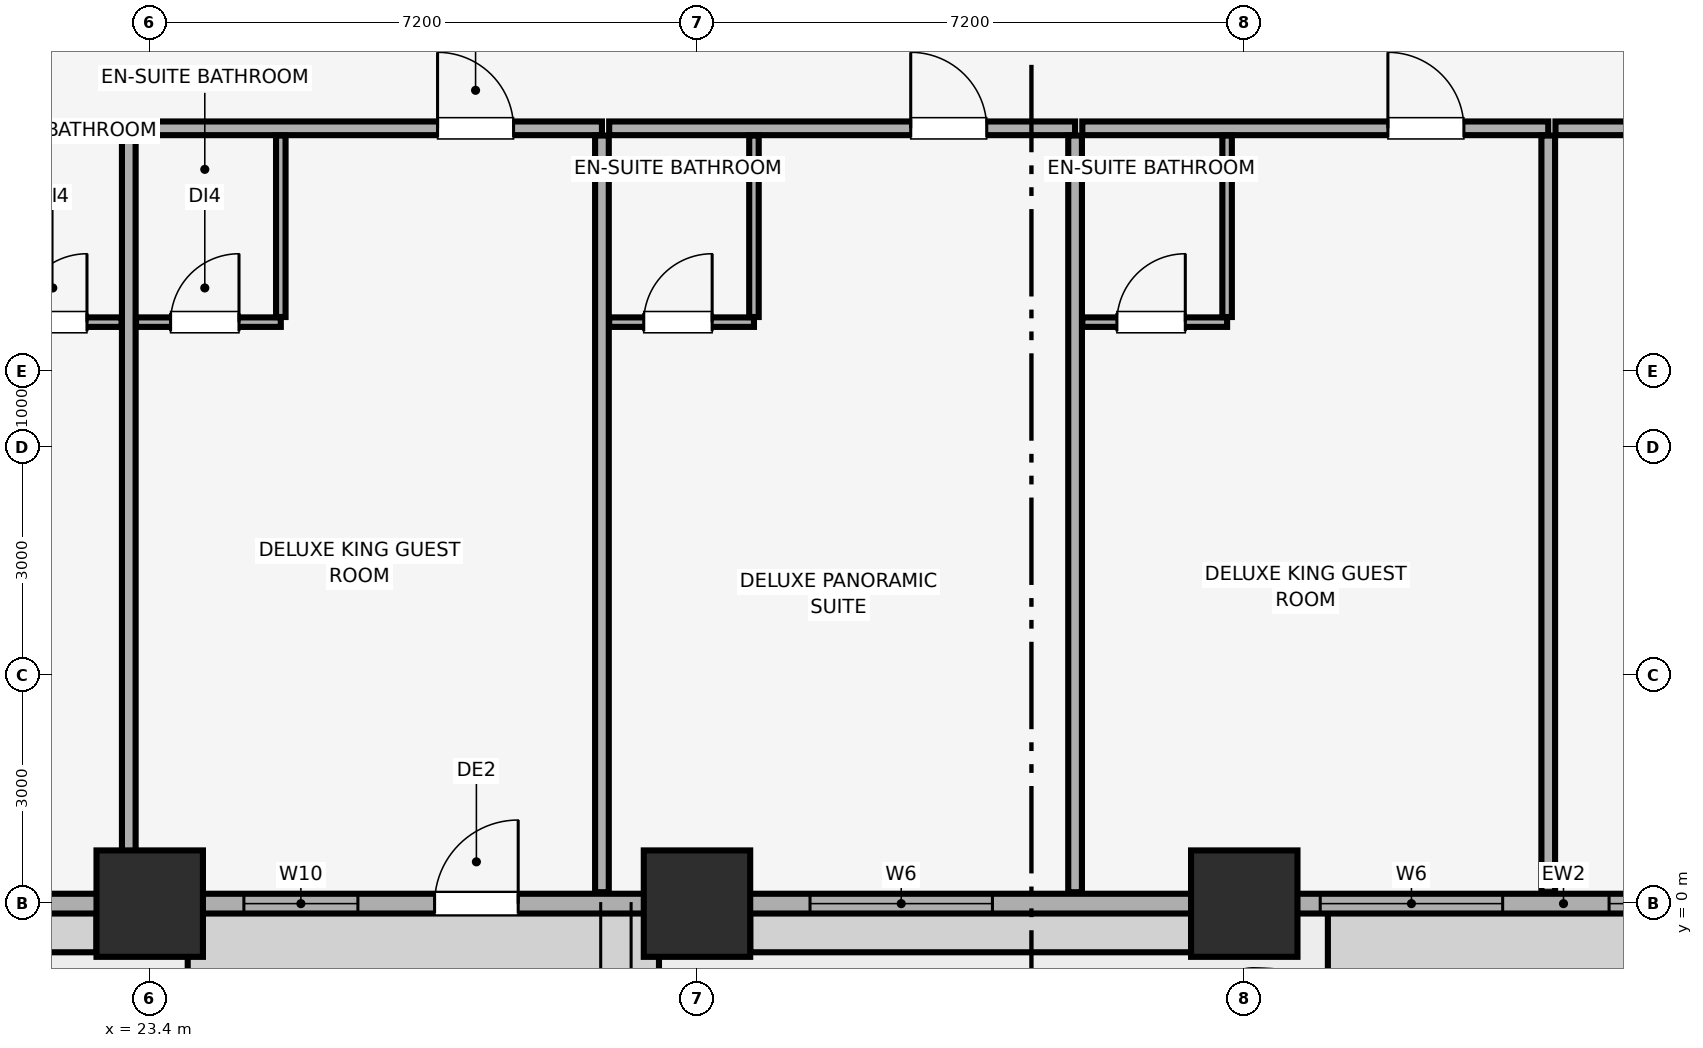
"""IFC4 building model, lengths in metres.
Left out: names, types, materials, properties, quantities, classifications, styles, units other than length and angle.
Written with IfcOpenShell. Run it as: python <this file> out.ifc"""

import sys

from ifc_helpers import new_model, si_unit, direction, frame, frame_2d, origin, origin_2d, place, context, subcontext, project, spatial, rectangle, extrude, element, fill, save


model = new_model("IFC4")
c1 = context("Model", 3, precision=1e-05, world=origin(), true_north=direction((0.0, 1.0)))
c2 = subcontext(c1, "Body", "Model", "MODEL_VIEW")
j1 = project(units=[si_unit("LENGTHUNIT", "METRE"), si_unit("PLANEANGLEUNIT", "RADIAN")], contexts=[c1])
p1 = place(None, origin())
s1 = spatial("IfcSite", under=j1, at=p1, CompositionType="ELEMENT")
p2 = place(p1, origin())
s2 = spatial("IfcBuilding", under=s1, at=p2, CompositionType="ELEMENT")
p3 = place(p2, frame((0.0, 0.0, 46.4)))
s3 = spatial("IfcBuildingStorey", under=s2, at=p3, CompositionType="ELEMENT", Elevation=46.4)
for number, where, z_axis, x_axis in (
    (1, (23.4, 0.0, 0.0), (0.0, 0.0, 1.0), (1.0, 0.0, 0.0)),
    (2, (30.6, 0.0, 0.0), (0.0, 0.0, 1.0), (1.0, 0.0, 0.0)),
    (3, (37.8, 0.0, 0.0), (0.0, 0.0, 1.0), (1.0, 0.0, 0.0)),
):
    element("IfcColumn", number, at=place(p3, frame(where, z_axis=z_axis, x_axis=x_axis)), inside=s3, PredefinedType="COLUMN", context=c2, shape_type="SweptSolid", body=[
        extrude(rectangle(XDim=1.4, YDim=1.4, at=origin_2d()), origin(), (0.0, 0.0, 1.0), 3.51),
    ])
p4 = place(p3, frame((4.2, 0.0, 0.0), z_axis=(0.0, 0.0, 1.0), x_axis=(1.0, 0.0, 0.0)))
e4 = element("IfcWall", 4, at=p4, inside=s3, PredefinedType="SOLIDWALL", context=c2, shape_type="SweptSolid", body=[
    extrude(rectangle(XDim=75.6, YDim=0.26, at=frame_2d((37.8, 0.0))), origin(), (0.0, 0.0, 1.0), 2.56),
])
p5 = place(p4, frame((22.948, 0.0, 0.0)))
e5 = element("IfcOpeningElement", 5, at=p5, cuts=e4, PredefinedType="OPENING", context=c2, shape_type="SweptSolid", body=[
    extrude(rectangle(XDim=1.1, YDim=2.15, at=frame_2d((0.55, 1.075))), frame((0.0, 0.14, 0.0), z_axis=(0.0, -1.0, 0.0), x_axis=(1.0, 0.0, 0.0)), (0.0, 0.0, 1.0), 0.28),
])
p6 = place(p4, frame((44.61, 0.0, 0.0)))
e6 = element("IfcOpeningElement", 6, at=p6, cuts=e4, PredefinedType="OPENING", context=c2, shape_type="SweptSolid", body=[
    extrude(rectangle(XDim=1.1, YDim=2.15, at=frame_2d((0.55, 1.075))), frame((0.0, 0.14, 0.0), z_axis=(0.0, -1.0, 0.0), x_axis=(1.0, 0.0, 0.0)), (0.0, 0.0, 1.0), 0.28),
])
p7 = place(p4, frame((66.272, 0.0, 0.0)))
e7 = element("IfcOpeningElement", 7, at=p7, cuts=e4, PredefinedType="OPENING", context=c2, shape_type="SweptSolid", body=[
    extrude(rectangle(XDim=1.1, YDim=2.15, at=frame_2d((0.55, 1.075))), frame((0.0, 0.14, 0.0), z_axis=(0.0, -1.0, 0.0), x_axis=(1.0, 0.0, 0.0)), (0.0, 0.0, 1.0), 0.28),
])
p8 = place(p4, frame((1.035, 0.0, 0.85)))
e8 = element("IfcOpeningElement", 8, at=p8, cuts=e4, PredefinedType="OPENING", context=c2, shape_type="SweptSolid", body=[
    extrude(rectangle(XDim=2.4, YDim=1.5, at=frame_2d((1.2, 0.75))), frame((0.0, 0.14, 0.0), z_axis=(0.0, -1.0, 0.0), x_axis=(1.0, 0.0, 0.0)), (0.0, 0.0, 1.0), 0.28),
])
p9 = place(p4, frame((7.837, 0.0, 0.85)))
e9 = element("IfcOpeningElement", 9, at=p9, cuts=e4, PredefinedType="OPENING", context=c2, shape_type="SweptSolid", body=[
    extrude(rectangle(XDim=2.4, YDim=1.5, at=frame_2d((1.2, 0.75))), frame((0.0, 0.14, 0.0), z_axis=(0.0, -1.0, 0.0), x_axis=(1.0, 0.0, 0.0)), (0.0, 0.0, 1.0), 0.28),
])
p10 = place(p4, frame((14.55, 0.0, 0.85)))
e10 = element("IfcOpeningElement", 10, at=p10, cuts=e4, PredefinedType="OPENING", context=c2, shape_type="SweptSolid", body=[
    extrude(rectangle(XDim=2.4, YDim=1.5, at=frame_2d((1.2, 0.75))), frame((0.0, 0.14, 0.0), z_axis=(0.0, -1.0, 0.0), x_axis=(1.0, 0.0, 0.0)), (0.0, 0.0, 1.0), 0.28),
])
p11 = place(p4, frame((20.439, 0.0, 0.85)))
e11 = element("IfcOpeningElement", 11, at=p11, cuts=e4, PredefinedType="OPENING", context=c2, shape_type="SweptSolid", body=[
    extrude(rectangle(XDim=1.5, YDim=1.4, at=frame_2d((0.75, 0.7))), frame((0.0, 0.14, 0.0), z_axis=(0.0, -1.0, 0.0), x_axis=(1.0, 0.0, 0.0)), (0.0, 0.0, 1.0), 0.28),
])
p12 = place(p4, frame((27.887, 0.0, 0.85)))
e12 = element("IfcOpeningElement", 12, at=p12, cuts=e4, PredefinedType="OPENING", context=c2, shape_type="SweptSolid", body=[
    extrude(rectangle(XDim=2.4, YDim=1.5, at=frame_2d((1.2, 0.75))), frame((0.0, 0.14, 0.0), z_axis=(0.0, -1.0, 0.0), x_axis=(1.0, 0.0, 0.0)), (0.0, 0.0, 1.0), 0.28),
])
p13 = place(p4, frame((34.6, 0.0, 0.85)))
e13 = element("IfcOpeningElement", 13, at=p13, cuts=e4, PredefinedType="OPENING", context=c2, shape_type="SweptSolid", body=[
    extrude(rectangle(XDim=2.4, YDim=1.5, at=frame_2d((1.2, 0.75))), frame((0.0, 0.14, 0.0), z_axis=(0.0, -1.0, 0.0), x_axis=(1.0, 0.0, 0.0)), (0.0, 0.0, 1.0), 0.28),
])
p14 = place(p4, frame((38.399, 0.0, 0.85)))
e14 = element("IfcOpeningElement", 14, at=p14, cuts=e4, PredefinedType="OPENING", context=c2, shape_type="SweptSolid", body=[
    extrude(rectangle(XDim=2.4, YDim=1.5, at=frame_2d((1.2, 0.75))), frame((0.0, 0.14, 0.0), z_axis=(0.0, -1.0, 0.0), x_axis=(1.0, 0.0, 0.0)), (0.0, 0.0, 1.0), 0.28),
])
p15 = place(p4, frame((46.59, 0.0, 0.85)))
e15 = element("IfcOpeningElement", 15, at=p15, cuts=e4, PredefinedType="OPENING", context=c2, shape_type="SweptSolid", body=[
    extrude(rectangle(XDim=1.5, YDim=1.4, at=frame_2d((0.75, 0.7))), frame((0.0, 0.14, 0.0), z_axis=(0.0, -1.0, 0.0), x_axis=(1.0, 0.0, 0.0)), (0.0, 0.0, 1.0), 0.28),
])
p16 = place(p4, frame((51.824, 0.0, 0.85)))
e16 = element("IfcOpeningElement", 16, at=p16, cuts=e4, PredefinedType="OPENING", context=c2, shape_type="SweptSolid", body=[
    extrude(rectangle(XDim=2.4, YDim=1.5, at=frame_2d((1.2, 0.75))), frame((0.0, 0.14, 0.0), z_axis=(0.0, -1.0, 0.0), x_axis=(1.0, 0.0, 0.0)), (0.0, 0.0, 1.0), 0.28),
])
p17 = place(p4, frame((58.449, 0.0, 0.85)))
e17 = element("IfcOpeningElement", 17, at=p17, cuts=e4, PredefinedType="OPENING", context=c2, shape_type="SweptSolid", body=[
    extrude(rectangle(XDim=2.4, YDim=1.5, at=frame_2d((1.2, 0.75))), frame((0.0, 0.14, 0.0), z_axis=(0.0, -1.0, 0.0), x_axis=(1.0, 0.0, 0.0)), (0.0, 0.0, 1.0), 0.28),
])
p18 = place(p4, frame((72.165, 0.0, 0.85)))
e18 = element("IfcOpeningElement", 18, at=p18, cuts=e4, PredefinedType="OPENING", context=c2, shape_type="SweptSolid", body=[
    extrude(rectangle(XDim=2.4, YDim=1.5, at=frame_2d((1.2, 0.75))), frame((0.0, 0.14, 0.0), z_axis=(0.0, -1.0, 0.0), x_axis=(1.0, 0.0, 0.0)), (0.0, 0.0, 1.0), 0.28),
])
p19 = place(p3, frame((16.995, 10.2, 0.0), z_axis=(0.0, 0.0, 1.0), x_axis=(1.0, 0.0, 0.0)))
e19 = element("IfcWall", 19, at=p19, inside=s3, PredefinedType="PARTITIONING", context=c2, shape_type="SweptSolid", body=[
    extrude(rectangle(XDim=6.13, YDim=0.18, at=frame_2d((3.065, 0.0))), origin(), (0.0, 0.0, 1.0), 3.51),
])
p20 = place(p19, frame((1.108, 0.0, 0.0)))
e20 = element("IfcOpeningElement", 20, at=p20, cuts=e19, PredefinedType="OPENING", context=c2, shape_type="SweptSolid", body=[
    extrude(rectangle(XDim=1.0, YDim=2.15, at=frame_2d((0.5, 1.075))), frame((0.0, 0.1, 0.0), z_axis=(0.0, -1.0, 0.0), x_axis=(1.0, 0.0, 0.0)), (0.0, 0.0, 1.0), 0.2),
])
p21 = place(p3, frame((23.125, 0.15, 0.0), z_axis=(0.0, 0.0, 1.0), x_axis=(0.0, 1.0, 0.0)))
e21 = element("IfcWall", 21, at=p21, inside=s3, PredefinedType="PARTITIONING", context=c2, shape_type="SweptSolid", body=[
    extrude(rectangle(XDim=9.955, YDim=0.18, at=frame_2d((4.978, 0.0))), origin(), (0.0, 0.0, 1.0), 2.88),
])
p22 = place(p3, frame((21.125, 7.65, 0.0), z_axis=(0.0, 0.0, 1.0), x_axis=(1.0, 0.0, 0.0)))
e22 = element("IfcWall", 22, at=p22, inside=s3, PredefinedType="PARTITIONING", context=c2, shape_type="SweptSolid", body=[
    extrude(rectangle(XDim=1.905, YDim=0.125, at=frame_2d((0.953, 0.0))), origin(), (0.0, 0.0, 1.0), 3.51),
])
p23 = place(p22, frame((0.55, 0.0, 0.0)))
e23 = element("IfcOpeningElement", 23, at=p23, cuts=e22, PredefinedType="OPENING", context=c2, shape_type="SweptSolid", body=[
    extrude(rectangle(XDim=0.9, YDim=2.1, at=frame_2d((0.45, 1.05))), frame((0.0, 0.073, 0.0), z_axis=(0.0, -1.0, 0.0), x_axis=(1.0, 0.0, 0.0)), (0.0, 0.0, 1.0), 0.145),
])
p24 = place(p3, frame((23.219, 10.2, 0.0), z_axis=(0.0, 0.0, 1.0), x_axis=(1.0, 0.0, 0.0)))
e24 = element("IfcWall", 24, at=p24, inside=s3, PredefinedType="PARTITIONING", context=c2, shape_type="SweptSolid", body=[
    extrude(rectangle(XDim=6.13, YDim=0.18, at=frame_2d((3.065, 0.0))), origin(), (0.0, 0.0, 1.0), 3.51),
])
p25 = place(p24, frame((3.967, 0.0, 0.0)))
e25 = element("IfcOpeningElement", 25, at=p25, cuts=e24, PredefinedType="OPENING", context=c2, shape_type="SweptSolid", body=[
    extrude(rectangle(XDim=1.0, YDim=2.15, at=frame_2d((0.5, 1.075))), frame((0.0, 0.1, 0.0), z_axis=(0.0, -1.0, 0.0), x_axis=(1.0, 0.0, 0.0)), (0.0, 0.0, 1.0), 0.2),
])
p26 = place(p3, frame((29.35, 0.15, 0.0), z_axis=(0.0, 0.0, 1.0), x_axis=(0.0, 1.0, 0.0)))
e26 = element("IfcWall", 26, at=p26, inside=s3, PredefinedType="PARTITIONING", context=c2, shape_type="SweptSolid", body=[
    extrude(rectangle(XDim=9.955, YDim=0.18, at=frame_2d((4.978, 0.0))), origin(), (0.0, 0.0, 1.0), 3.51),
])
p27 = place(p3, frame((23.219, 7.65, 0.0), z_axis=(0.0, 0.0, 1.0), x_axis=(1.0, 0.0, 0.0)))
e27 = element("IfcWall", 27, at=p27, inside=s3, PredefinedType="PARTITIONING", context=c2, shape_type="SweptSolid", body=[
    extrude(rectangle(XDim=1.905, YDim=0.125, at=frame_2d((0.953, 0.0))), origin(), (0.0, 0.0, 1.0), 3.51),
])
p28 = place(p27, frame((0.455, 0.0, 0.0)))
e28 = element("IfcOpeningElement", 28, at=p28, cuts=e27, PredefinedType="OPENING", context=c2, shape_type="SweptSolid", body=[
    extrude(rectangle(XDim=0.9, YDim=2.1, at=frame_2d((0.45, 1.05))), frame((0.0, 0.073, 0.0), z_axis=(0.0, -1.0, 0.0), x_axis=(1.0, 0.0, 0.0)), (0.0, 0.0, 1.0), 0.145),
])
p29 = place(p3, frame((25.125, 7.718, 0.0), z_axis=(0.0, 0.0, 1.0), x_axis=(0.0, 1.0, 0.0)))
e29 = element("IfcWall", 29, at=p29, inside=s3, PredefinedType="PARTITIONING", context=c2, shape_type="SweptSolid", body=[
    extrude(rectangle(XDim=2.387, YDim=0.125, at=frame_2d((1.194, 0.0))), origin(), (0.0, 0.0, 1.0), 3.51),
])
p30 = place(p3, frame((29.445, 10.2, 0.0), z_axis=(0.0, 0.0, 1.0), x_axis=(1.0, 0.0, 0.0)))
e30 = element("IfcWall", 30, at=p30, inside=s3, PredefinedType="PARTITIONING", context=c2, shape_type="SweptSolid", body=[
    extrude(rectangle(XDim=6.13, YDim=0.18, at=frame_2d((3.065, 0.0))), origin(), (0.0, 0.0, 1.0), 3.51),
])
p31 = place(p30, frame((3.967, 0.0, 0.0)))
e31 = element("IfcOpeningElement", 31, at=p31, cuts=e30, PredefinedType="OPENING", context=c2, shape_type="SweptSolid", body=[
    extrude(rectangle(XDim=1.0, YDim=2.15, at=frame_2d((0.5, 1.075))), frame((0.0, 0.1, 0.0), z_axis=(0.0, -1.0, 0.0), x_axis=(1.0, 0.0, 0.0)), (0.0, 0.0, 1.0), 0.2),
])
p32 = place(p3, frame((35.574, 0.15, 0.0), z_axis=(0.0, 0.0, 1.0), x_axis=(0.0, 1.0, 0.0)))
e32 = element("IfcWall", 32, at=p32, inside=s3, PredefinedType="PARTITIONING", context=c2, shape_type="SweptSolid", body=[
    extrude(rectangle(XDim=9.955, YDim=0.18, at=frame_2d((4.978, 0.0))), origin(), (0.0, 0.0, 1.0), 3.51),
])
p33 = place(p3, frame((29.445, 7.65, 0.0), z_axis=(0.0, 0.0, 1.0), x_axis=(1.0, 0.0, 0.0)))
e33 = element("IfcWall", 33, at=p33, inside=s3, PredefinedType="PARTITIONING", context=c2, shape_type="SweptSolid", body=[
    extrude(rectangle(XDim=1.905, YDim=0.125, at=frame_2d((0.953, 0.0))), origin(), (0.0, 0.0, 1.0), 3.51),
])
p34 = place(p33, frame((0.455, 0.0, 0.0)))
e34 = element("IfcOpeningElement", 34, at=p34, cuts=e33, PredefinedType="OPENING", context=c2, shape_type="SweptSolid", body=[
    extrude(rectangle(XDim=0.9, YDim=2.1, at=frame_2d((0.45, 1.05))), frame((0.0, 0.073, 0.0), z_axis=(0.0, -1.0, 0.0), x_axis=(1.0, 0.0, 0.0)), (0.0, 0.0, 1.0), 0.145),
])
p35 = place(p3, frame((31.35, 7.718, 0.0), z_axis=(0.0, 0.0, 1.0), x_axis=(0.0, 1.0, 0.0)))
e35 = element("IfcWall", 35, at=p35, inside=s3, PredefinedType="PARTITIONING", context=c2, shape_type="SweptSolid", body=[
    extrude(rectangle(XDim=2.387, YDim=0.125, at=frame_2d((1.194, 0.0))), origin(), (0.0, 0.0, 1.0), 3.51),
])
p36 = place(p3, frame((35.669, 10.2, 0.0), z_axis=(0.0, 0.0, 1.0), x_axis=(1.0, 0.0, 0.0)))
e36 = element("IfcWall", 36, at=p36, inside=s3, PredefinedType="PARTITIONING", context=c2, shape_type="SweptSolid", body=[
    extrude(rectangle(XDim=6.13, YDim=0.18, at=frame_2d((3.065, 0.0))), origin(), (0.0, 0.0, 1.0), 3.51),
])
p37 = place(p36, frame((4.02, 0.0, 0.0)))
e37 = element("IfcOpeningElement", 37, at=p37, cuts=e36, PredefinedType="OPENING", context=c2, shape_type="SweptSolid", body=[
    extrude(rectangle(XDim=1.0, YDim=2.15, at=frame_2d((0.5, 1.075))), frame((0.0, 0.1, 0.0), z_axis=(0.0, -1.0, 0.0), x_axis=(1.0, 0.0, 0.0)), (0.0, 0.0, 1.0), 0.2),
])
p38 = place(p3, frame((41.799, 0.15, 0.0), z_axis=(0.0, 0.0, 1.0), x_axis=(0.0, 1.0, 0.0)))
e38 = element("IfcWall", 38, at=p38, inside=s3, PredefinedType="PARTITIONING", context=c2, shape_type="SweptSolid", body=[
    extrude(rectangle(XDim=9.955, YDim=0.18, at=frame_2d((4.978, 0.0))), origin(), (0.0, 0.0, 1.0), 2.898),
])
p39 = place(p3, frame((35.669, 7.65, 0.0), z_axis=(0.0, 0.0, 1.0), x_axis=(1.0, 0.0, 0.0)))
e39 = element("IfcWall", 39, at=p39, inside=s3, PredefinedType="PARTITIONING", context=c2, shape_type="SweptSolid", body=[
    extrude(rectangle(XDim=1.905, YDim=0.125, at=frame_2d((0.953, 0.0))), origin(), (0.0, 0.0, 1.0), 3.51),
])
p40 = place(p39, frame((0.455, 0.0, 0.0)))
e40 = element("IfcOpeningElement", 40, at=p40, cuts=e39, PredefinedType="OPENING", context=c2, shape_type="SweptSolid", body=[
    extrude(rectangle(XDim=0.9, YDim=2.1, at=frame_2d((0.45, 1.05))), frame((0.0, 0.073, 0.0), z_axis=(0.0, -1.0, 0.0), x_axis=(1.0, 0.0, 0.0)), (0.0, 0.0, 1.0), 0.145),
])
p41 = place(p3, frame((37.574, 7.718, 0.0), z_axis=(0.0, 0.0, 1.0), x_axis=(0.0, 1.0, 0.0)))
e41 = element("IfcWall", 41, at=p41, inside=s3, PredefinedType="PARTITIONING", context=c2, shape_type="SweptSolid", body=[
    extrude(rectangle(XDim=2.387, YDim=0.125, at=frame_2d((1.194, 0.0))), origin(), (0.0, 0.0, 1.0), 2.898),
])
p42 = place(p3, frame((41.894, 10.2, 0.0), z_axis=(0.0, 0.0, 1.0), x_axis=(1.0, 0.0, 0.0)))
e42 = element("IfcWall", 42, at=p42, inside=s3, PredefinedType="PARTITIONING", context=c2, shape_type="SweptSolid", body=[
    extrude(rectangle(XDim=6.13, YDim=0.18, at=frame_2d((3.065, 0.0))), origin(), (0.0, 0.0, 1.0), 3.51),
])
p43 = place(p42, frame((1.067, 0.0, 0.0)))
e43 = element("IfcOpeningElement", 43, at=p43, cuts=e42, PredefinedType="OPENING", context=c2, shape_type="SweptSolid", body=[
    extrude(rectangle(XDim=1.0, YDim=2.15, at=frame_2d((0.5, 1.075))), frame((0.0, 0.1, 0.0), z_axis=(0.0, -1.0, 0.0), x_axis=(1.0, 0.0, 0.0)), (0.0, 0.0, 1.0), 0.2),
])
p44 = place(p5, origin())
e44 = element("IfcDoor", 44, at=p44, inside=s3, OperationType="SINGLE_SWING_RIGHT", PredefinedType="DOOR", context=c2, shape_type="SweptSolid", body=[
    extrude(rectangle(XDim=1.1, YDim=2.15, at=frame_2d((0.55, 1.075))), frame((0.0, 0.025, 0.0), z_axis=(0.0, -1.0, 0.0), x_axis=(1.0, 0.0, 0.0)), (0.0, 0.0, 1.0), 0.05),
])
fill(e5, e44)
p45 = place(p11, origin())
e45 = element("IfcWindow", 45, at=p45, inside=s3, PartitioningType="SINGLE_PANEL", PredefinedType="WINDOW", context=c2, shape_type="SweptSolid", body=[
    extrude(rectangle(XDim=1.5, YDim=1.4, at=frame_2d((0.75, 0.7))), frame((0.0, 0.03, 0.0), z_axis=(0.0, -1.0, 0.0), x_axis=(1.0, 0.0, 0.0)), (0.0, 0.0, 1.0), 0.06),
])
fill(e11, e45)
p46 = place(p12, origin())
e46 = element("IfcWindow", 46, at=p46, inside=s3, PartitioningType="SINGLE_PANEL", PredefinedType="WINDOW", context=c2, shape_type="SweptSolid", body=[
    extrude(rectangle(XDim=2.4, YDim=1.5, at=frame_2d((1.2, 0.75))), frame((0.0, 0.03, 0.0), z_axis=(0.0, -1.0, 0.0), x_axis=(1.0, 0.0, 0.0)), (0.0, 0.0, 1.0), 0.06),
])
fill(e12, e46)
p47 = place(p13, origin())
e47 = element("IfcWindow", 47, at=p47, inside=s3, PartitioningType="SINGLE_PANEL", PredefinedType="WINDOW", context=c2, shape_type="SweptSolid", body=[
    extrude(rectangle(XDim=2.4, YDim=1.5, at=frame_2d((1.2, 0.75))), frame((0.0, 0.03, 0.0), z_axis=(0.0, -1.0, 0.0), x_axis=(1.0, 0.0, 0.0)), (0.0, 0.0, 1.0), 0.06),
])
fill(e13, e47)
p48 = place(p14, origin())
e48 = element("IfcWindow", 48, at=p48, inside=s3, PartitioningType="SINGLE_PANEL", PredefinedType="WINDOW", context=c2, shape_type="SweptSolid", body=[
    extrude(rectangle(XDim=2.4, YDim=1.5, at=frame_2d((1.2, 0.75))), frame((0.0, 0.03, 0.0), z_axis=(0.0, -1.0, 0.0), x_axis=(1.0, 0.0, 0.0)), (0.0, 0.0, 1.0), 0.06),
])
fill(e14, e48)
p49 = place(p23, origin())
e49 = element("IfcDoor", 49, at=p49, inside=s3, OperationType="SINGLE_SWING_RIGHT", PredefinedType="DOOR", context=c2, shape_type="SweptSolid", body=[
    extrude(rectangle(XDim=0.9, YDim=2.1, at=frame_2d((0.45, 1.05))), frame((0.0, 0.025, 0.0), z_axis=(0.0, -1.0, 0.0), x_axis=(1.0, 0.0, 0.0)), (0.0, 0.0, 1.0), 0.05),
])
fill(e23, e49)
p50 = place(p25, origin())
e50 = element("IfcDoor", 50, at=p50, inside=s3, OperationType="SINGLE_SWING_LEFT", PredefinedType="DOOR", context=c2, shape_type="SweptSolid", body=[
    extrude(rectangle(XDim=1.0, YDim=2.15, at=frame_2d((0.5, 1.075))), frame((0.0, 0.025, 0.0), z_axis=(0.0, -1.0, 0.0), x_axis=(1.0, 0.0, 0.0)), (0.0, 0.0, 1.0), 0.05),
])
fill(e25, e50)
p51 = place(p28, origin())
e51 = element("IfcDoor", 51, at=p51, inside=s3, OperationType="SINGLE_SWING_RIGHT", PredefinedType="DOOR", context=c2, shape_type="SweptSolid", body=[
    extrude(rectangle(XDim=0.9, YDim=2.1, at=frame_2d((0.45, 1.05))), frame((0.0, 0.025, 0.0), z_axis=(0.0, -1.0, 0.0), x_axis=(1.0, 0.0, 0.0)), (0.0, 0.0, 1.0), 0.05),
])
fill(e28, e51)
p52 = place(p31, origin())
e52 = element("IfcDoor", 52, at=p52, inside=s3, OperationType="SINGLE_SWING_LEFT", PredefinedType="DOOR", context=c2, shape_type="SweptSolid", body=[
    extrude(rectangle(XDim=1.0, YDim=2.15, at=frame_2d((0.5, 1.075))), frame((0.0, 0.025, 0.0), z_axis=(0.0, -1.0, 0.0), x_axis=(1.0, 0.0, 0.0)), (0.0, 0.0, 1.0), 0.05),
])
fill(e31, e52)
p53 = place(p34, origin())
e53 = element("IfcDoor", 53, at=p53, inside=s3, OperationType="SINGLE_SWING_RIGHT", PredefinedType="DOOR", context=c2, shape_type="SweptSolid", body=[
    extrude(rectangle(XDim=0.9, YDim=2.1, at=frame_2d((0.45, 1.05))), frame((0.0, 0.025, 0.0), z_axis=(0.0, -1.0, 0.0), x_axis=(1.0, 0.0, 0.0)), (0.0, 0.0, 1.0), 0.05),
])
fill(e34, e53)
p54 = place(p37, origin())
e54 = element("IfcDoor", 54, at=p54, inside=s3, OperationType="SINGLE_SWING_LEFT", PredefinedType="DOOR", context=c2, shape_type="SweptSolid", body=[
    extrude(rectangle(XDim=1.0, YDim=2.15, at=frame_2d((0.5, 1.075))), frame((0.0, 0.025, 0.0), z_axis=(0.0, -1.0, 0.0), x_axis=(1.0, 0.0, 0.0)), (0.0, 0.0, 1.0), 0.05),
])
fill(e37, e54)
p55 = place(p40, origin())
e55 = element("IfcDoor", 55, at=p55, inside=s3, OperationType="SINGLE_SWING_RIGHT", PredefinedType="DOOR", context=c2, shape_type="SweptSolid", body=[
    extrude(rectangle(XDim=0.9, YDim=2.1, at=frame_2d((0.45, 1.05))), frame((0.0, 0.025, 0.0), z_axis=(0.0, -1.0, 0.0), x_axis=(1.0, 0.0, 0.0)), (0.0, 0.0, 1.0), 0.05),
])
fill(e40, e55)
save(model, sys.argv[1])
